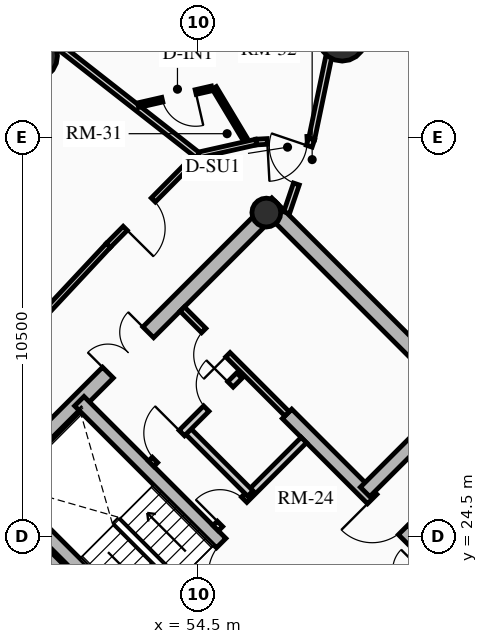
"""IFC4 building model, lengths in metres.
Left out: names, types, materials, properties, quantities, classifications, styles, units other than length and angle.
Written with IfcOpenShell. Run it as: python <this file> out.ifc"""

import sys

from ifc_helpers import new_model, si_unit, direction, frame, frame_2d, origin, origin_2d, place, context, subcontext, project, spatial, rectangle, circle, hollow_circle, extrude, source, transform, mapped, element, fill, save


model = new_model("IFC4")
c1 = context("Model", 3, precision=1e-05, world=origin(), true_north=direction((0.0, 1.0)))
c2 = subcontext(c1, "Body", "Model", "MODEL_VIEW")
j1 = project(units=[si_unit("LENGTHUNIT", "METRE"), si_unit("PLANEANGLEUNIT", "RADIAN")], contexts=[c1])
p1 = place(None, origin())
s1 = spatial("IfcSite", under=j1, at=p1, CompositionType="ELEMENT")
p2 = place(p1, origin())
s2 = spatial("IfcBuilding", under=s1, at=p2, CompositionType="ELEMENT")
p3 = place(p2, frame((0.0, 0.0, 177.79)))
s3 = spatial("IfcBuildingStorey", under=s2, at=p3, CompositionType="ELEMENT", Elevation=177.79)
for number, where, z_axis, x_axis in (
    (1, (58.702, 15.732, 0.0), (0.0, 0.0, 1.0), (-0.707, 0.707, 0.0)),
    (2, (66.268, 23.298, 0.0), (0.0, 0.0, 1.0), (-0.707, 0.707, 0.0)),
):
    element("IfcWall", number, at=place(p3, frame(where, z_axis=z_axis, x_axis=x_axis)), inside=s3, PredefinedType="SHEAR", context=c2, shape_type="SweptSolid", body=[
        extrude(rectangle(XDim=14.1, YDim=0.4, at=frame_2d((7.05, 0.0))), origin(), (0.0, 0.0, 1.0), 2.91),
    ])
p4 = place(p3, frame((48.873, 25.561, 0.0), z_axis=(0.0, 0.0, 1.0), x_axis=(0.707106781187, 0.707106781187, 0.0)))
e3 = element("IfcWall", 3, at=p4, inside=s3, PredefinedType="SHEAR", context=c2, shape_type="SweptSolid", body=[
    extrude(rectangle(XDim=10.7, YDim=0.4, at=frame_2d((5.35, 0.0))), origin(), (0.0, 0.0, 1.0), 2.91),
])
m1 = source(origin(), c2, "Body", "SweptSolid", [
    extrude(rectangle(XDim=1.5, YDim=2.02, at=frame_2d((0.75, 1.01))), frame((0.0, 0.21, 0.0), z_axis=(0.0, -1.0, 0.0), x_axis=(1.0, 0.0, 0.0)), (0.0, 0.0, 1.0), 0.42),
])
p5 = place(p4, frame((4.6, 0.0, 0.0)))
e4 = element("IfcOpeningElement", 4, at=p5, cuts=e3, PredefinedType="OPENING", context=c2, shape_type="MappedRepresentation", body=[
    mapped(m1, transform((0.0, 0.0, 0.0), x_axis=(1.0, 0.0, 0.0), y_axis=(0.0, 1.0, 0.0), z_axis=(0.0, 0.0, 1.0), scale=1.0)),
])
p6 = place(p3, frame((61.06, 18.373, 0.0), z_axis=(0.0, 0.0, 1.0), x_axis=(-0.707106781187, 0.707106781187, 0.0)))
e5 = element("IfcWall", 5, at=p6, inside=s3, PredefinedType="SHEAR", context=c2, shape_type="SweptSolid", body=[
    extrude(rectangle(XDim=13.7, YDim=0.35, at=frame_2d((6.85, 0.0))), origin(), (0.0, 0.0, 1.0), 2.91),
])
m2 = source(origin(), c2, "Body", "SweptSolid", [
    extrude(rectangle(XDim=1.1, YDim=2.015, at=frame_2d((0.55, 1.007))), frame((0.0, 0.185, 0.0), z_axis=(0.0, -1.0, 0.0), x_axis=(1.0, 0.0, 0.0)), (0.0, 0.0, 1.0), 0.37),
])
p7 = place(p6, frame((4.85, 0.0, 0.0)))
e6 = element("IfcOpeningElement", 6, at=p7, cuts=e5, PredefinedType="OPENING", context=c2, shape_type="MappedRepresentation", body=[
    mapped(m2, transform((0.0, 0.0, 0.0), x_axis=(1.0, 0.0, 0.0), y_axis=(0.0, 1.0, 0.0), z_axis=(0.0, 0.0, 1.0), scale=1.0)),
])
p8 = place(p6, frame((0.625, 0.0, 0.0)))
e7 = element("IfcOpeningElement", 7, at=p8, cuts=e5, PredefinedType="OPENING", context=c2, shape_type="MappedRepresentation", body=[
    mapped(m2, transform((0.0, 0.0, 0.0), x_axis=(1.0, 0.0, 0.0), y_axis=(0.0, 1.0, 0.0), z_axis=(0.0, 0.0, 1.0), scale=1.0)),
])
p9 = place(p6, frame((2.625, 0.0, 0.0)))
e8 = element("IfcOpeningElement", 8, at=p9, cuts=e5, PredefinedType="OPENING", context=c2, shape_type="MappedRepresentation", body=[
    mapped(m2, transform((0.0, 0.0, 0.0), x_axis=(1.0, 0.0, 0.0), y_axis=(0.0, 1.0, 0.0), z_axis=(0.0, 0.0, 1.0), scale=1.0)),
])
m3 = source(origin(), c2, "Body", "SweptSolid", [
    extrude(rectangle(XDim=1.15, YDim=2.02, at=frame_2d((0.575, 1.01))), frame((0.0, 0.185, 0.0), z_axis=(0.0, -1.0, 0.0), x_axis=(1.0, 0.0, 0.0)), (0.0, 0.0, 1.0), 0.37),
])
p10 = place(p6, frame((7.27, 0.0, 0.0)))
e9 = element("IfcOpeningElement", 9, at=p10, cuts=e5, PredefinedType="OPENING", context=c2, shape_type="MappedRepresentation", body=[
    mapped(m3, transform((0.0, 0.0, 0.0), x_axis=(1.0, 0.0, 0.0), y_axis=(0.0, 1.0, 0.0), z_axis=(0.0, 0.0, 1.0), scale=1.0)),
])
p11 = place(p3, frame((63.627, 20.94, 0.0), z_axis=(0.0, 0.0, 1.0), x_axis=(-0.707119496762, 0.707094065383, 0.0)))
e10 = element("IfcWall", 10, at=p11, inside=s3, PredefinedType="SHEAR", context=c2, shape_type="SweptSolid", body=[
    extrude(rectangle(XDim=9.6, YDim=0.35, at=frame_2d((4.8, 0.0))), origin(), (0.0, 0.0, 1.0), 2.91),
])
p12 = place(p11, frame((5.28, 0.0, 0.0)))
e11 = element("IfcOpeningElement", 11, at=p12, cuts=e10, PredefinedType="OPENING", context=c2, shape_type="MappedRepresentation", body=[
    mapped(m3, transform((0.0, 0.0, 0.0), x_axis=(1.0, 0.0, 0.0), y_axis=(0.0, 1.0, 0.0), z_axis=(0.0, 0.0, 1.0), scale=1.0)),
])
p13 = place(p3, frame((53.922, 21.141, 0.0), z_axis=(0.0, 0.0, 1.0), x_axis=(-0.707106781187, 0.707106781187, 0.0)))
e12 = element("IfcWall", 12, at=p13, inside=s3, PredefinedType="SHEAR", context=c2, shape_type="SweptSolid", body=[
    extrude(rectangle(XDim=6.695, YDim=0.35, at=frame_2d((3.348, 0.0))), origin(), (0.0, 0.0, 1.0), 2.91),
])
p14 = place(p3, frame((58.893, 25.674, 0.0), z_axis=(0.0, 0.0, 1.0), x_axis=(0.707106781187, 0.707106781187, 0.0)))
e13 = element("IfcWall", 13, at=p14, inside=s3, PredefinedType="SHEAR", context=c2, shape_type="SweptSolid", body=[
    extrude(rectangle(XDim=3.285, YDim=0.35, at=frame_2d((1.643, 0.0))), origin(), (0.0, 0.0, 1.0), 2.91),
])
p15 = place(p3, frame((56.294, 33.024, 0.0), z_axis=(0.0, 0.0, 1.0), x_axis=(0.707106781187, 0.707106781187, 0.0)))
e14 = element("IfcColumn", 14, at=p15, inside=s3, PredefinedType="COLUMN", context=c2, shape_type="SweptSolid", body=[
    extrude(hollow_circle(Radius=0.38, WallThickness=0.032, at=origin_2d()), origin(), (0.0, 0.0, 1.0), 2.91),
])
for number, where, z_axis, x_axis in (
    (15, (58.291, 37.635, 0.0), (0.0, 0.0, 1.0), (1.0, 0.0, 0.0)),
    (16, (50.173, 37.146, 0.0), (0.0, 0.0, 1.0), (1.0, 0.0, 0.0)),
):
    element("IfcColumn", number, at=place(p3, frame(where, z_axis=z_axis, x_axis=x_axis)), inside=s3, PredefinedType="USERDEFINED", context=c2, shape_type="SweptSolid", body=[
        extrude(circle(Radius=0.625, at=origin_2d()), origin(), (0.0, 0.0, 1.0), 2.91),
    ])
p16 = place(p3, frame((58.214, 21.467, 0.0), z_axis=(0.0, 0.0, 1.0), x_axis=(0.707106781187, 0.707106781187, 0.0)))
e17 = element("IfcWall", 17, at=p16, inside=s3, PredefinedType="PARTITIONING", context=c2, shape_type="SweptSolid", body=[
    extrude(rectangle(XDim=3.28, YDim=0.2, at=frame_2d((1.64, 0.0))), origin(), (0.0, 0.0, 1.0), 2.675),
])
m4 = source(origin(), c2, "Body", "SweptSolid", [
    extrude(rectangle(XDim=1.5, YDim=2.02, at=frame_2d((0.75, 1.01))), frame((0.0, 0.11, 0.0), z_axis=(0.0, -1.0, 0.0), x_axis=(1.0, 0.0, 0.0)), (0.0, 0.0, 1.0), 0.22),
])
p17 = place(p16, frame((1.55, 0.0, 0.0)))
e18 = element("IfcOpeningElement", 18, at=p17, cuts=e17, PredefinedType="OPENING", context=c2, shape_type="MappedRepresentation", body=[
    mapped(m4, transform((0.0, 0.0, 0.0), x_axis=(1.0, 0.0, 0.0), y_axis=(0.0, 1.0, 0.0), z_axis=(0.0, 0.0, 1.0), scale=1.0)),
])
p18 = place(p3, frame((54.961, 24.719, 0.0), z_axis=(0.0, 0.0, 1.0), x_axis=(0.707106781187, 0.707106781187, 0.0)))
e19 = element("IfcWall", 19, at=p18, inside=s3, PredefinedType="PARTITIONING", context=c2, shape_type="SweptSolid", body=[
    extrude(rectangle(XDim=3.28, YDim=0.2, at=frame_2d((1.64, 0.0))), origin(), (0.0, 0.0, 1.0), 2.675),
])
m5 = source(origin(), c2, "Body", "SweptSolid", [
    extrude(rectangle(XDim=0.9, YDim=2.005, at=frame_2d((0.45, 1.002))), frame((0.0, 0.11, 0.0), z_axis=(0.0, -1.0, 0.0), x_axis=(1.0, 0.0, 0.0)), (0.0, 0.0, 1.0), 0.22),
])
p19 = place(p18, frame((0.16, 0.0, 0.0)))
e20 = element("IfcOpeningElement", 20, at=p19, cuts=e19, PredefinedType="OPENING", context=c2, shape_type="MappedRepresentation", body=[
    mapped(m5, transform((0.0, 0.0, 0.0), x_axis=(1.0, 0.0, 0.0), y_axis=(0.0, 1.0, 0.0), z_axis=(0.0, 0.0, 1.0), scale=1.0)),
])
p20 = place(p3, frame((55.874, 25.631, 0.0), z_axis=(0.0, 0.0, 1.0), x_axis=(-0.707157639372, 0.707055919343, 0.0)))
e21 = element("IfcWall", 21, at=p20, inside=s3, PredefinedType="PARTITIONING", context=c2, shape_type="SweptSolid", body=[
    extrude(rectangle(XDim=2.4, YDim=0.2, at=frame_2d((1.2, 0.0))), origin(), (0.0, 0.0, 1.0), 2.675),
])
p21 = place(p3, frame((53.264, 26.416, 0.0), z_axis=(0.0, 0.0, 1.0), x_axis=(0.707106781187, 0.707106781187, 0.0)))
e22 = element("IfcWall", 22, at=p21, inside=s3, PredefinedType="PARTITIONING", context=c2, shape_type="SweptSolid", body=[
    extrude(rectangle(XDim=3.28, YDim=0.2, at=frame_2d((1.64, 0.0))), origin(), (0.0, 0.0, 1.0), 2.675),
])
m6 = source(origin(), c2, "Body", "SweptSolid", [
    extrude(rectangle(XDim=1.0, YDim=2.015, at=frame_2d((0.5, 1.007))), frame((0.0, 0.11, 0.0), z_axis=(0.0, -1.0, 0.0), x_axis=(1.0, 0.0, 0.0)), (0.0, 0.0, 1.0), 0.22),
])
p22 = place(p21, frame((0.14, 0.0, 0.0)))
e23 = element("IfcOpeningElement", 23, at=p22, cuts=e22, PredefinedType="OPENING", context=c2, shape_type="MappedRepresentation", body=[
    mapped(m6, transform((0.0, 0.0, 0.0), x_axis=(1.0, 0.0, 0.0), y_axis=(0.0, 1.0, 0.0), z_axis=(0.0, 0.0, 1.0), scale=1.0)),
])
p23 = place(p21, frame((2.05, 0.0, 0.0)))
e24 = element("IfcOpeningElement", 24, at=p23, cuts=e22, PredefinedType="OPENING", context=c2, shape_type="MappedRepresentation", body=[
    mapped(m5, transform((0.0, 0.0, 0.0), x_axis=(1.0, 0.0, 0.0), y_axis=(0.0, 1.0, 0.0), z_axis=(0.0, 0.0, 1.0), scale=1.0)),
])
p24 = place(p3, frame((56.839, 27.728, 0.0), z_axis=(0.0, 0.0, 1.0), x_axis=(-0.707106781187, 0.707106781187, 0.0)))
e25 = element("IfcWall", 25, at=p24, inside=s3, PredefinedType="PARTITIONING", context=c2, shape_type="SweptSolid", body=[
    extrude(rectangle(XDim=3.9, YDim=0.16, at=frame_2d((1.95, 0.0))), origin(), (0.0, 0.0, 1.0), 2.675),
])
m7 = source(origin(), c2, "Body", "SweptSolid", [
    extrude(rectangle(XDim=0.9, YDim=2.005, at=frame_2d((0.45, 1.002))), frame((0.0, 0.09, 0.0), z_axis=(0.0, -1.0, 0.0), x_axis=(1.0, 0.0, 0.0)), (0.0, 0.0, 1.0), 0.18),
])
p25 = place(p24, frame((2.2, 0.0, 0.0)))
e26 = element("IfcOpeningElement", 26, at=p25, cuts=e25, PredefinedType="OPENING", context=c2, shape_type="MappedRepresentation", body=[
    mapped(m7, transform((0.0, 0.0, 0.0), x_axis=(1.0, 0.0, 0.0), y_axis=(0.0, 1.0, 0.0), z_axis=(0.0, 0.0, 1.0), scale=1.0)),
])
p26 = place(p3, frame((57.486, 34.96, 0.0), z_axis=(0.0, 0.0, 1.0), x_axis=(-0.998483871836, -0.055045051404, 0.0)))
e27 = element("IfcWall", 27, at=p26, inside=s3, PredefinedType="PARTITIONING", context=c2, shape_type="SweptSolid", body=[
    extrude(rectangle(XDim=1.464, YDim=0.15, at=frame_2d((0.732, 0.0))), origin(), (0.0, 0.0, 1.0), 2.245),
])
m8 = source(origin(), c2, "Body", "SweptSolid", [
    extrude(rectangle(XDim=1.05, YDim=2.015, at=frame_2d((0.525, 1.007))), frame((0.0, 0.085, 0.0), z_axis=(0.0, -1.0, 0.0), x_axis=(1.0, 0.0, 0.0)), (0.0, 0.0, 1.0), 0.17),
])
p27 = place(p26, frame((0.12, 0.0, 0.0)))
e28 = element("IfcOpeningElement", 28, at=p27, cuts=e27, PredefinedType="OPENING", context=c2, shape_type="MappedRepresentation", body=[
    mapped(m8, transform((0.0, 0.0, 0.0), x_axis=(1.0, 0.0, 0.0), y_axis=(0.0, 1.0, 0.0), z_axis=(0.0, 0.0, 1.0), scale=1.0)),
])
p28 = place(p3, frame((56.025, 34.88, 0.0), z_axis=(0.0, 0.0, 1.0), x_axis=(-0.975729093394, -0.218981132301, 0.0)))
e29 = element("IfcWall", 29, at=p28, inside=s3, PredefinedType="PARTITIONING", context=c2, shape_type="SweptSolid", body=[
    extrude(rectangle(XDim=1.575, YDim=0.15, at=frame_2d((0.788, 0.0))), origin(), (0.0, 0.0, 1.0), 2.245),
])
p29 = place(p3, frame((54.488, 34.535, 0.0), z_axis=(0.0, 0.0, 1.0), x_axis=(-0.703666289339, -0.710530613871, 0.0)))
e30 = element("IfcWall", 30, at=p29, inside=s3, PredefinedType="PARTITIONING", context=c2, shape_type="SweptSolid", body=[
    extrude(rectangle(XDim=3.343, YDim=0.15, at=frame_2d((1.672, 0.0))), origin(), (0.0, 0.0, 1.0), 2.245),
])
p30 = place(p29, frame((1.66, 0.0, 0.0)))
e31 = element("IfcOpeningElement", 31, at=p30, cuts=e30, PredefinedType="OPENING", context=c2, shape_type="MappedRepresentation", body=[
    mapped(m8, transform((0.0, 0.0, 0.0), x_axis=(1.0, 0.0, 0.0), y_axis=(0.0, 1.0, 0.0), z_axis=(0.0, 0.0, 1.0), scale=1.0)),
])
p31 = place(p3, frame((52.135, 32.159, 0.0), z_axis=(0.0, 0.0, 1.0), x_axis=(-0.682546302454, -0.730842353047, 0.0)))
e32 = element("IfcWall", 32, at=p31, inside=s3, PredefinedType="PARTITIONING", context=c2, shape_type="SweptSolid", body=[
    extrude(rectangle(XDim=6.445, YDim=0.15, at=frame_2d((3.223, 0.0))), origin(), (0.0, 0.0, 1.0), 2.245),
])
p32 = place(p3, frame((57.486, 34.96, 0.0), z_axis=(0.0, 0.0, 1.0), x_axis=(0.204011788318, 0.978968431681, 0.0)))
e33 = element("IfcWall", 33, at=p32, inside=s3, PredefinedType="PARTITIONING", context=c2, shape_type="SweptSolid", body=[
    extrude(rectangle(XDim=4.236, YDim=0.16, at=frame_2d((2.118, 0.0))), origin(), (0.0, 0.0, 1.0), 2.245),
])
p33 = place(p3, frame((54.488, 34.535, 0.0), z_axis=(0.0, 0.0, 1.0), x_axis=(-0.787155500995, 0.616754584298, 0.0)))
e34 = element("IfcWall", 34, at=p33, inside=s3, PredefinedType="PARTITIONING", context=c2, shape_type="SweptSolid", body=[
    extrude(rectangle(XDim=6.562, YDim=0.16, at=frame_2d((3.281, 0.0))), origin(), (0.0, 0.0, 1.0), 2.245),
])
p34 = place(p3, frame((56.828, 33.021, 0.0), z_axis=(0.0, 0.0, 1.0), x_axis=(0.321300161671, 0.94697740528, 0.0)))
e35 = element("IfcWall", 35, at=p34, inside=s3, PredefinedType="PARTITIONING", context=c2, shape_type="SweptSolid", body=[
    extrude(rectangle(XDim=2.049, YDim=0.16, at=frame_2d((1.024, 0.0))), origin(), (0.0, 0.0, 1.0), 2.245),
])
m9 = source(origin(), c2, "Body", "SweptSolid", [
    extrude(rectangle(XDim=1.05, YDim=2.015, at=frame_2d((0.525, 1.007))), frame((0.0, 0.09, 0.0), z_axis=(0.0, -1.0, 0.0), x_axis=(1.0, 0.0, 0.0)), (0.0, 0.0, 1.0), 0.18),
])
p35 = place(p34, frame((0.798, 0.0, 0.0)))
e36 = element("IfcOpeningElement", 36, at=p35, cuts=e35, PredefinedType="OPENING", context=c2, shape_type="MappedRepresentation", body=[
    mapped(m9, transform((0.0, 0.0, 0.0), x_axis=(1.0, 0.0, 0.0), y_axis=(0.0, 1.0, 0.0), z_axis=(0.0, 0.0, 1.0), scale=1.0)),
])
p36 = place(p3, frame((55.727, 34.97, 0.0), z_axis=(0.0, 0.0, 1.0), x_axis=(-0.514518774568, 0.857479113808, 0.0)))
e37 = element("IfcWall", 37, at=p36, inside=s3, PredefinedType="PARTITIONING", context=c2, shape_type="SweptSolid", body=[
    extrude(rectangle(XDim=1.56, YDim=0.125, at=frame_2d((0.78, 0.0))), origin(), (0.0, 0.0, 1.0), 2.245),
])
p37 = place(p3, frame((54.864, 36.293, 0.0), z_axis=(0.0, 0.0, 1.0), x_axis=(-0.974875983782, -0.222748324896, 0.0)))
e38 = element("IfcWall", 38, at=p37, inside=s3, PredefinedType="PARTITIONING", context=c2, shape_type="SweptSolid", body=[
    extrude(rectangle(XDim=1.994, YDim=0.125, at=frame_2d((0.997, 0.0))), origin(), (0.0, 0.0, 1.0), 2.675),
])
m10 = source(origin(), c2, "Body", "SweptSolid", [
    extrude(rectangle(XDim=0.9, YDim=2.005, at=frame_2d((0.45, 1.002))), frame((0.0, 0.073, 0.0), z_axis=(0.0, -1.0, 0.0), x_axis=(1.0, 0.0, 0.0)), (0.0, 0.0, 1.0), 0.145),
])
p38 = place(p37, frame((0.44, 0.0, 0.0)))
e39 = element("IfcOpeningElement", 39, at=p38, cuts=e38, PredefinedType="OPENING", context=c2, shape_type="MappedRepresentation", body=[
    mapped(m10, transform((0.0, 0.0, 0.0), x_axis=(1.0, 0.0, 0.0), y_axis=(0.0, 1.0, 0.0), z_axis=(0.0, 0.0, 1.0), scale=1.0)),
])
m11 = source(origin(), c2, "Body", "SweptSolid", [
    extrude(rectangle(XDim=1.15, YDim=2.02, at=frame_2d((0.575, 1.01))), frame((0.0, 0.025, 0.0), z_axis=(0.0, -1.0, 0.0), x_axis=(1.0, 0.0, 0.0)), (0.0, 0.0, 1.0), 0.05),
])
p39 = place(p10, origin())
e40 = element("IfcDoor", 40, at=p39, inside=s3, OperationType="SINGLE_SWING_LEFT", PredefinedType="DOOR", context=c2, shape_type="MappedRepresentation", body=[
    mapped(m11, transform((0.0, 0.0, 0.0), x_axis=(1.0, 0.0, 0.0), y_axis=(0.0, 1.0, 0.0), z_axis=(0.0, 0.0, 1.0), scale=1.0)),
])
fill(e9, e40)
p40 = place(p12, origin())
e41 = element("IfcDoor", 41, at=p40, inside=s3, OperationType="SINGLE_SWING_RIGHT", PredefinedType="DOOR", context=c2, shape_type="MappedRepresentation", body=[
    mapped(m11, transform((0.0, 0.0, 0.0), x_axis=(1.0, 0.0, 0.0), y_axis=(0.0, 1.0, 0.0), z_axis=(0.0, 0.0, 1.0), scale=1.0)),
])
fill(e11, e41)
m12 = source(origin(), c2, "Body", "SweptSolid", [
    extrude(rectangle(XDim=1.5, YDim=2.02, at=frame_2d((0.75, 1.01))), frame((0.0, 0.025, 0.0), z_axis=(0.0, -1.0, 0.0), x_axis=(1.0, 0.0, 0.0)), (0.0, 0.0, 1.0), 0.05),
])
p41 = place(p5, origin())
e42 = element("IfcDoor", 42, at=p41, inside=s3, OperationType="DOUBLE_DOOR_SINGLE_SWING", PredefinedType="DOOR", context=c2, shape_type="MappedRepresentation", body=[
    mapped(m12, transform((0.0, 0.0, 0.0), x_axis=(1.0, 0.0, 0.0), y_axis=(0.0, 1.0, 0.0), z_axis=(0.0, 0.0, 1.0), scale=1.0)),
])
fill(e4, e42)
m13 = source(origin(), c2, "Body", "SweptSolid", [
    extrude(rectangle(XDim=0.9, YDim=2.005, at=frame_2d((0.45, 1.002))), frame((0.0, 0.025, 0.0), z_axis=(0.0, -1.0, 0.0), x_axis=(1.0, 0.0, 0.0)), (0.0, 0.0, 1.0), 0.05),
])
p42 = place(p19, origin())
e43 = element("IfcDoor", 43, at=p42, inside=s3, OperationType="SINGLE_SWING_LEFT", PredefinedType="DOOR", context=c2, shape_type="MappedRepresentation", body=[
    mapped(m13, transform((0.0, 0.0, 0.0), x_axis=(1.0, 0.0, 0.0), y_axis=(0.0, 1.0, 0.0), z_axis=(0.0, 0.0, 1.0), scale=1.0)),
])
fill(e20, e43)
m14 = source(origin(), c2, "Body", "SweptSolid", [
    extrude(rectangle(XDim=1.0, YDim=2.015, at=frame_2d((0.5, 1.007))), frame((0.0, 0.025, 0.0), z_axis=(0.0, -1.0, 0.0), x_axis=(1.0, 0.0, 0.0)), (0.0, 0.0, 1.0), 0.05),
])
p43 = place(p22, origin())
e44 = element("IfcDoor", 44, at=p43, inside=s3, OperationType="SINGLE_SWING_RIGHT", PredefinedType="DOOR", context=c2, shape_type="MappedRepresentation", body=[
    mapped(m14, transform((0.0, 0.0, 0.0), x_axis=(1.0, 0.0, 0.0), y_axis=(0.0, 1.0, 0.0), z_axis=(0.0, 0.0, 1.0), scale=1.0)),
])
fill(e23, e44)
p44 = place(p23, origin())
e45 = element("IfcDoor", 45, at=p44, inside=s3, OperationType="SINGLE_SWING_RIGHT", PredefinedType="DOOR", context=c2, shape_type="MappedRepresentation", body=[
    mapped(m13, transform((0.0, 0.0, 0.0), x_axis=(1.0, 0.0, 0.0), y_axis=(0.0, 1.0, 0.0), z_axis=(0.0, 0.0, 1.0), scale=1.0)),
])
fill(e24, e45)
p45 = place(p25, origin())
e46 = element("IfcDoor", 46, at=p45, inside=s3, OperationType="SINGLE_SWING_LEFT", PredefinedType="DOOR", context=c2, shape_type="MappedRepresentation", body=[
    mapped(m13, transform((0.0, 0.0, 0.0), x_axis=(1.0, 0.0, 0.0), y_axis=(0.0, 1.0, 0.0), z_axis=(0.0, 0.0, 1.0), scale=1.0)),
])
fill(e26, e46)
m15 = source(origin(), c2, "Body", "SweptSolid", [
    extrude(rectangle(XDim=1.05, YDim=2.015, at=frame_2d((0.525, 1.007))), frame((0.0, 0.025, 0.0), z_axis=(0.0, -1.0, 0.0), x_axis=(1.0, 0.0, 0.0)), (0.0, 0.0, 1.0), 0.05),
])
p46 = place(p35, origin())
e47 = element("IfcDoor", 47, at=p46, inside=s3, OperationType="SINGLE_SWING_RIGHT", PredefinedType="DOOR", context=c2, shape_type="MappedRepresentation", body=[
    mapped(m15, transform((0.0, 0.0, 0.0), x_axis=(1.0, 0.0, 0.0), y_axis=(0.0, 1.0, 0.0), z_axis=(0.0, 0.0, 1.0), scale=1.0)),
])
fill(e36, e47)
p47 = place(p27, origin())
e48 = element("IfcDoor", 48, at=p47, inside=s3, OperationType="SINGLE_SWING_RIGHT", PredefinedType="DOOR", context=c2, shape_type="MappedRepresentation", body=[
    mapped(m15, transform((0.0, 0.0, 0.0), x_axis=(1.0, 0.0, 0.0), y_axis=(0.0, 1.0, 0.0), z_axis=(0.0, 0.0, 1.0), scale=1.0)),
])
fill(e28, e48)
p48 = place(p38, origin())
e49 = element("IfcDoor", 49, at=p48, inside=s3, OperationType="SINGLE_SWING_LEFT", PredefinedType="DOOR", context=c2, shape_type="MappedRepresentation", body=[
    mapped(m13, transform((0.0, 0.0, 0.0), x_axis=(1.0, 0.0, 0.0), y_axis=(0.0, 1.0, 0.0), z_axis=(0.0, 0.0, 1.0), scale=1.0)),
])
fill(e39, e49)
p49 = place(p30, origin())
e50 = element("IfcDoor", 50, at=p49, inside=s3, OperationType="SINGLE_SWING_RIGHT", PredefinedType="DOOR", context=c2, shape_type="MappedRepresentation", body=[
    mapped(m15, transform((0.0, 0.0, 0.0), x_axis=(1.0, 0.0, 0.0), y_axis=(0.0, 1.0, 0.0), z_axis=(0.0, 0.0, 1.0), scale=1.0)),
])
fill(e31, e50)
save(model, sys.argv[1])
